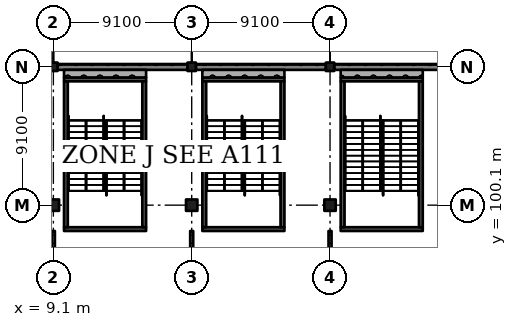
"""IFC4 building model, lengths in metres.
Left out: names, types, materials, properties, quantities, classifications, styles, units other than length and angle.
Written with IfcOpenShell. Run it as: python <this file> out.ifc"""

import sys

from ifc_helpers import new_model, si_unit, direction, frame, frame_2d, origin, origin_2d, place, context, subcontext, project, spatial, rectangle, extrude, element, fill, save


model = new_model("IFC4")
c1 = context("Model", 3, precision=1e-05, world=origin(), true_north=direction((0.0, 1.0)))
c2 = subcontext(c1, "Body", "Model", "MODEL_VIEW")
j1 = project(units=[si_unit("LENGTHUNIT", "METRE"), si_unit("PLANEANGLEUNIT", "RADIAN")], contexts=[c1])
p1 = place(None, origin())
s1 = spatial("IfcSite", under=j1, at=p1, CompositionType="ELEMENT")
p2 = place(p1, origin())
s2 = spatial("IfcBuilding", under=s1, at=p2, CompositionType="ELEMENT")
p3 = place(p2, origin())
s3 = spatial("IfcBuildingStorey", under=s2, at=p3, CompositionType="ELEMENT", Elevation=0.0)
p4 = place(p3, frame((9.1, 100.1, -0.4), z_axis=(0.0, 0.0, 1.0), x_axis=(1.0, 0.0, 0.0)))
e1 = element("IfcColumn", 1, at=p4, inside=s3, PredefinedType="COLUMN", context=c2, shape_type="SweptSolid", body=[
    extrude(rectangle(XDim=0.75, YDim=0.75, at=origin_2d()), origin(), (0.0, 0.0, 1.0), 6.77),
])
p5 = place(p3, frame((9.1, 109.2, -0.4), z_axis=(0.0, 0.0, 1.0), x_axis=(1.0, 0.0, 0.0)))
e2 = element("IfcColumn", 2, at=p5, inside=s3, PredefinedType="COLUMN", context=c2, shape_type="SweptSolid", body=[
    extrude(rectangle(XDim=0.55, YDim=0.55, at=origin_2d()), origin(), (0.0, 0.0, 1.0), 6.77),
])
p6 = place(p3, frame((18.2, 100.1, -0.4), z_axis=(0.0, 0.0, 1.0), x_axis=(1.0, 0.0, 0.0)))
e3 = element("IfcColumn", 3, at=p6, inside=s3, PredefinedType="COLUMN", context=c2, shape_type="SweptSolid", body=[
    extrude(rectangle(XDim=0.75, YDim=0.75, at=origin_2d()), origin(), (0.0, 0.0, 1.0), 6.77),
])
p7 = place(p3, frame((18.2, 109.2, -0.4), z_axis=(0.0, 0.0, 1.0), x_axis=(1.0, 0.0, 0.0)))
e4 = element("IfcColumn", 4, at=p7, inside=s3, PredefinedType="COLUMN", context=c2, shape_type="SweptSolid", body=[
    extrude(rectangle(XDim=0.55, YDim=0.55, at=origin_2d()), origin(), (0.0, 0.0, 1.0), 6.77),
])
p8 = place(p3, frame((27.3, 100.1, -0.4), z_axis=(0.0, 0.0, 1.0), x_axis=(1.0, 0.0, 0.0)))
e5 = element("IfcColumn", 5, at=p8, inside=s3, PredefinedType="COLUMN", context=c2, shape_type="SweptSolid", body=[
    extrude(rectangle(XDim=0.75, YDim=0.75, at=origin_2d()), origin(), (0.0, 0.0, 1.0), 6.77),
])
p9 = place(p3, frame((27.3, 109.2, -0.4), z_axis=(0.0, 0.0, 1.0), x_axis=(1.0, 0.0, 0.0)))
e6 = element("IfcColumn", 6, at=p9, inside=s3, PredefinedType="COLUMN", context=c2, shape_type="SweptSolid", body=[
    extrude(rectangle(XDim=0.55, YDim=0.55, at=origin_2d()), origin(), (0.0, 0.0, 1.0), 6.77),
])
p10 = place(p3, frame((15.2, 98.525, -0.4), z_axis=(0.0, 0.0, 1.0), x_axis=(-1.0, 0.0, 0.0)))
e7 = element("IfcWall", 7, at=p10, inside=s3, PredefinedType="SHEAR", context=c2, shape_type="SweptSolid", body=[
    extrude(rectangle(XDim=5.4, YDim=0.25, at=frame_2d((2.7, 0.0))), origin(), (0.0, 0.0, 1.0), 6.77),
])
p11 = place(p10, frame((1.5, 0.0, 0.4)))
e8 = element("IfcOpeningElement", 8, at=p11, cuts=e7, PredefinedType="OPENING", context=c2, shape_type="SweptSolid", body=[
    extrude(rectangle(XDim=2.4, YDim=2.1, at=frame_2d((1.2, 1.05))), frame((0.0, 0.135, 0.0), z_axis=(0.0, -1.0, 0.0), x_axis=(1.0, 0.0, 0.0)), (0.0, 0.0, 1.0), 0.27),
])
p12 = place(p3, frame((15.2, 108.375, -0.4), z_axis=(0.0, 0.0, 1.0), x_axis=(-1.0, 0.0, 0.0)))
e9 = element("IfcWall", 9, at=p12, inside=s3, PredefinedType="SHEAR", context=c2, shape_type="SweptSolid", body=[
    extrude(rectangle(XDim=5.4, YDim=0.25, at=frame_2d((2.7, 0.0))), origin(), (0.0, 0.0, 1.0), 6.77),
])
p13 = place(p3, frame((9.925, 108.25, -0.4), z_axis=(0.0, 0.0, 1.0), x_axis=(0.0, -1.0, 0.0)))
e10 = element("IfcWall", 10, at=p13, inside=s3, PredefinedType="SHEAR", context=c2, shape_type="SweptSolid", body=[
    extrude(rectangle(XDim=9.6, YDim=0.25, at=frame_2d((4.8, 0.0))), origin(), (0.0, 0.0, 1.0), 6.77),
])
p14 = place(p3, frame((15.075, 108.25, -0.4), z_axis=(0.0, 0.0, 1.0), x_axis=(0.0, -1.0, 0.0)))
e11 = element("IfcWall", 11, at=p14, inside=s3, PredefinedType="SHEAR", context=c2, shape_type="SweptSolid", body=[
    extrude(rectangle(XDim=9.6, YDim=0.25, at=frame_2d((4.8, 0.0))), origin(), (0.0, 0.0, 1.0), 6.77),
])
p15 = place(p14, frame((7.95, 0.0, 0.4)))
e12 = element("IfcOpeningElement", 12, at=p15, cuts=e11, PredefinedType="OPENING", context=c2, shape_type="SweptSolid", body=[
    extrude(rectangle(XDim=1.2, YDim=2.1, at=frame_2d((0.6, 1.05))), frame((0.0, 0.135, 0.0), z_axis=(0.0, -1.0, 0.0), x_axis=(1.0, 0.0, 0.0)), (0.0, 0.0, 1.0), 0.27),
])
p16 = place(p3, frame((24.3, 98.525, -0.4), z_axis=(0.0, 0.0, 1.0), x_axis=(-1.0, 0.0, 0.0)))
e13 = element("IfcWall", 13, at=p16, inside=s3, PredefinedType="SHEAR", context=c2, shape_type="SweptSolid", body=[
    extrude(rectangle(XDim=5.4, YDim=0.25, at=frame_2d((2.7, 0.0))), origin(), (0.0, 0.0, 1.0), 6.77),
])
p17 = place(p16, frame((1.5, 0.0, 0.4)))
e14 = element("IfcOpeningElement", 14, at=p17, cuts=e13, PredefinedType="OPENING", context=c2, shape_type="SweptSolid", body=[
    extrude(rectangle(XDim=2.4, YDim=2.1, at=frame_2d((1.2, 1.05))), frame((0.0, 0.135, 0.0), z_axis=(0.0, -1.0, 0.0), x_axis=(1.0, 0.0, 0.0)), (0.0, 0.0, 1.0), 0.27),
])
p18 = place(p3, frame((24.3, 108.375, -0.4), z_axis=(0.0, 0.0, 1.0), x_axis=(-1.0, 0.0, 0.0)))
e15 = element("IfcWall", 15, at=p18, inside=s3, PredefinedType="SHEAR", context=c2, shape_type="SweptSolid", body=[
    extrude(rectangle(XDim=5.4, YDim=0.25, at=frame_2d((2.7, 0.0))), origin(), (0.0, 0.0, 1.0), 6.77),
])
p19 = place(p3, frame((19.025, 108.25, -0.4), z_axis=(0.0, 0.0, 1.0), x_axis=(0.0, -1.0, 0.0)))
e16 = element("IfcWall", 16, at=p19, inside=s3, PredefinedType="SHEAR", context=c2, shape_type="SweptSolid", body=[
    extrude(rectangle(XDim=9.6, YDim=0.25, at=frame_2d((4.8, 0.0))), origin(), (0.0, 0.0, 1.0), 6.77),
])
p20 = place(p3, frame((24.175, 108.25, -0.4), z_axis=(0.0, 0.0, 1.0), x_axis=(0.0, -1.0, 0.0)))
e17 = element("IfcWall", 17, at=p20, inside=s3, PredefinedType="SHEAR", context=c2, shape_type="SweptSolid", body=[
    extrude(rectangle(XDim=9.6, YDim=0.25, at=frame_2d((4.8, 0.0))), origin(), (0.0, 0.0, 1.0), 6.77),
])
p21 = place(p20, frame((7.95, 0.0, 0.4)))
e18 = element("IfcOpeningElement", 18, at=p21, cuts=e17, PredefinedType="OPENING", context=c2, shape_type="SweptSolid", body=[
    extrude(rectangle(XDim=1.2, YDim=2.1, at=frame_2d((0.6, 1.05))), frame((0.0, 0.135, 0.0), z_axis=(0.0, -1.0, 0.0), x_axis=(1.0, 0.0, 0.0)), (0.0, 0.0, 1.0), 0.27),
])
p22 = place(p3, frame((33.4, 98.525, -0.4), z_axis=(0.0, 0.0, 1.0), x_axis=(-1.0, 0.0, 0.0)))
e19 = element("IfcWall", 19, at=p22, inside=s3, PredefinedType="SHEAR", context=c2, shape_type="SweptSolid", body=[
    extrude(rectangle(XDim=5.4, YDim=0.25, at=frame_2d((2.7, 0.0))), origin(), (0.0, 0.0, 1.0), 6.77),
])
p23 = place(p22, frame((1.5, 0.0, 0.4)))
e20 = element("IfcOpeningElement", 20, at=p23, cuts=e19, PredefinedType="OPENING", context=c2, shape_type="SweptSolid", body=[
    extrude(rectangle(XDim=2.4, YDim=2.1, at=frame_2d((1.2, 1.05))), frame((0.0, 0.135, 0.0), z_axis=(0.0, -1.0, 0.0), x_axis=(1.0, 0.0, 0.0)), (0.0, 0.0, 1.0), 0.27),
])
p24 = place(p3, frame((33.4, 108.375, -0.4), z_axis=(0.0, 0.0, 1.0), x_axis=(-1.0, 0.0, 0.0)))
e21 = element("IfcWall", 21, at=p24, inside=s3, PredefinedType="SHEAR", context=c2, shape_type="SweptSolid", body=[
    extrude(rectangle(XDim=5.4, YDim=0.25, at=frame_2d((2.7, 0.0))), origin(), (0.0, 0.0, 1.0), 6.77),
])
p25 = place(p3, frame((28.125, 108.25, -0.4), z_axis=(0.0, 0.0, 1.0), x_axis=(0.0, -1.0, 0.0)))
e22 = element("IfcWall", 22, at=p25, inside=s3, PredefinedType="SHEAR", context=c2, shape_type="SweptSolid", body=[
    extrude(rectangle(XDim=9.6, YDim=0.25, at=frame_2d((4.8, 0.0))), origin(), (0.0, 0.0, 1.0), 6.77),
])
p26 = place(p3, frame((33.275, 108.25, -0.4), z_axis=(0.0, 0.0, 1.0), x_axis=(0.0, -1.0, 0.0)))
e23 = element("IfcWall", 23, at=p26, inside=s3, PredefinedType="SHEAR", context=c2, shape_type="SweptSolid", body=[
    extrude(rectangle(XDim=9.6, YDim=0.25, at=frame_2d((4.8, 0.0))), origin(), (0.0, 0.0, 1.0), 6.77),
])
p27 = place(p26, frame((7.95, 0.0, 0.4)))
e24 = element("IfcOpeningElement", 24, at=p27, cuts=e23, PredefinedType="OPENING", context=c2, shape_type="SweptSolid", body=[
    extrude(rectangle(XDim=1.2, YDim=2.1, at=frame_2d((0.6, 1.05))), frame((0.0, 0.135, 0.0), z_axis=(0.0, -1.0, 0.0), x_axis=(1.0, 0.0, 0.0)), (0.0, 0.0, 1.0), 0.27),
])
p28 = place(p3, frame((36.05, 109.175, 0.0), z_axis=(0.0, 0.0, 1.0), x_axis=(-1.0, 0.0, 0.0)))
e25 = element("IfcWall", 25, at=p28, inside=s3, PredefinedType="SOLIDWALL", context=c2, shape_type="SweptSolid", body=[
    extrude(rectangle(XDim=8.475, YDim=0.35, at=frame_2d((4.238, 0.0))), origin(), (0.0, 0.0, 1.0), 5.27),
])
p29 = place(p28, frame((0.4, 0.0, 0.0)))
e26 = element("IfcOpeningElement", 26, at=p29, cuts=e25, PredefinedType="OPENING", context=c2, shape_type="SweptSolid", body=[
    extrude(rectangle(XDim=2.1, YDim=2.4, at=frame_2d((1.05, 1.2))), frame((0.0, 0.185, 0.0), z_axis=(0.0, -1.0, 0.0), x_axis=(1.0, 0.0, 0.0)), (0.0, 0.0, 1.0), 0.37),
])
p30 = place(p3, frame((27.025, 109.175, 0.0), z_axis=(0.0, 0.0, 1.0), x_axis=(-1.0, 0.0, 0.0)))
e27 = element("IfcWall", 27, at=p30, inside=s3, PredefinedType="SOLIDWALL", context=c2, shape_type="SweptSolid", body=[
    extrude(rectangle(XDim=8.55, YDim=0.35, at=frame_2d((4.275, 0.0))), origin(), (0.0, 0.0, 1.0), 5.27),
])
p31 = place(p30, frame((0.475, 0.0, 0.0)))
e28 = element("IfcOpeningElement", 28, at=p31, cuts=e27, PredefinedType="OPENING", context=c2, shape_type="SweptSolid", body=[
    extrude(rectangle(XDim=2.1, YDim=2.4, at=frame_2d((1.05, 1.2))), frame((0.0, 0.185, 0.0), z_axis=(0.0, -1.0, 0.0), x_axis=(1.0, 0.0, 0.0)), (0.0, 0.0, 1.0), 0.37),
])
p32 = place(p3, frame((17.925, 109.175, 0.0), z_axis=(0.0, 0.0, 1.0), x_axis=(-1.0, 0.0, 0.0)))
e29 = element("IfcWall", 29, at=p32, inside=s3, PredefinedType="SOLIDWALL", context=c2, shape_type="SweptSolid", body=[
    extrude(rectangle(XDim=8.55, YDim=0.35, at=frame_2d((4.275, 0.0))), origin(), (0.0, 0.0, 1.0), 5.27),
])
p33 = place(p32, frame((0.475, 0.0, 0.0)))
e30 = element("IfcOpeningElement", 30, at=p33, cuts=e29, PredefinedType="OPENING", context=c2, shape_type="SweptSolid", body=[
    extrude(rectangle(XDim=2.1, YDim=2.4, at=frame_2d((1.05, 1.2))), frame((0.0, 0.185, 0.0), z_axis=(0.0, -1.0, 0.0), x_axis=(1.0, 0.0, 0.0)), (0.0, 0.0, 1.0), 0.37),
])
p34 = place(p3, frame((9.8, 108.75, 0.0), z_axis=(0.0, 0.0, 1.0), x_axis=(1.0, 0.0, 0.0)))
e31 = element("IfcWall", 31, at=p34, inside=s3, PredefinedType="SOLIDWALL", context=c2, shape_type="SweptSolid", body=[
    extrude(rectangle(XDim=5.4, YDim=0.5, at=frame_2d((2.7, 0.0))), origin(), (0.0, 0.0, 1.0), 6.37),
])
p35 = place(p3, frame((18.9, 108.75, 0.0), z_axis=(0.0, 0.0, 1.0), x_axis=(1.0, 0.0, 0.0)))
e32 = element("IfcWall", 32, at=p35, inside=s3, PredefinedType="SOLIDWALL", context=c2, shape_type="SweptSolid", body=[
    extrude(rectangle(XDim=5.4, YDim=0.5, at=frame_2d((2.7, 0.0))), origin(), (0.0, 0.0, 1.0), 6.37),
])
p36 = place(p3, frame((28.0, 108.75, 0.0), z_axis=(0.0, 0.0, 1.0), x_axis=(1.0, 0.0, 0.0)))
e33 = element("IfcWall", 33, at=p36, inside=s3, PredefinedType="SOLIDWALL", context=c2, shape_type="SweptSolid", body=[
    extrude(rectangle(XDim=5.4, YDim=0.5, at=frame_2d((2.7, 0.0))), origin(), (0.0, 0.0, 1.0), 6.37),
])
p37 = place(p3, frame((9.1, 98.4, 0.0), z_axis=(0.0, 0.0, 1.0), x_axis=(0.0, -1.0, 0.0)))
e34 = element("IfcWall", 34, at=p37, inside=s3, PredefinedType="PARTITIONING", context=c2, shape_type="SweptSolid", body=[
    extrude(rectangle(XDim=6.975, YDim=0.2, at=frame_2d((3.487, 0.0))), origin(), (0.0, 0.0, 1.0), 5.32),
])
p38 = place(p37, frame((0.85, 0.0, 0.0)))
e35 = element("IfcOpeningElement", 35, at=p38, cuts=e34, PredefinedType="OPENING", context=c2, shape_type="SweptSolid", body=[
    extrude(rectangle(XDim=1.8, YDim=2.4, at=frame_2d((0.9, 1.2))), frame((0.0, 0.11, 0.0), z_axis=(0.0, -1.0, 0.0), x_axis=(1.0, 0.0, 0.0)), (0.0, 0.0, 1.0), 0.22),
])
p39 = place(p37, frame((4.35, 0.0, 0.0)))
e36 = element("IfcOpeningElement", 36, at=p39, cuts=e34, PredefinedType="OPENING", context=c2, shape_type="SweptSolid", body=[
    extrude(rectangle(XDim=1.8, YDim=2.4, at=frame_2d((0.9, 1.2))), frame((0.0, 0.11, 0.0), z_axis=(0.0, -1.0, 0.0), x_axis=(1.0, 0.0, 0.0)), (0.0, 0.0, 1.0), 0.22),
])
p40 = place(p3, frame((18.2, 98.4, 0.0), z_axis=(0.0, 0.0, 1.0), x_axis=(0.0, -1.0, 0.0)))
e37 = element("IfcWall", 37, at=p40, inside=s3, PredefinedType="PARTITIONING", context=c2, shape_type="SweptSolid", body=[
    extrude(rectangle(XDim=6.925, YDim=0.2, at=frame_2d((3.462, 0.0))), origin(), (0.0, 0.0, 1.0), 5.32),
])
p41 = place(p40, frame((0.85, 0.0, 0.0)))
e38 = element("IfcOpeningElement", 38, at=p41, cuts=e37, PredefinedType="OPENING", context=c2, shape_type="SweptSolid", body=[
    extrude(rectangle(XDim=1.8, YDim=2.4, at=frame_2d((0.9, 1.2))), frame((0.0, 0.11, 0.0), z_axis=(0.0, -1.0, 0.0), x_axis=(1.0, 0.0, 0.0)), (0.0, 0.0, 1.0), 0.22),
])
p42 = place(p40, frame((4.25, 0.0, 0.0)))
e39 = element("IfcOpeningElement", 39, at=p42, cuts=e37, PredefinedType="OPENING", context=c2, shape_type="SweptSolid", body=[
    extrude(rectangle(XDim=1.8, YDim=2.4, at=frame_2d((0.9, 1.2))), frame((0.0, 0.11, 0.0), z_axis=(0.0, -1.0, 0.0), x_axis=(1.0, 0.0, 0.0)), (0.0, 0.0, 1.0), 0.22),
])
p43 = place(p3, frame((27.3, 98.4, 0.0), z_axis=(0.0, 0.0, 1.0), x_axis=(0.0, -1.0, 0.0)))
e40 = element("IfcWall", 40, at=p43, inside=s3, PredefinedType="PARTITIONING", context=c2, shape_type="SweptSolid", body=[
    extrude(rectangle(XDim=6.925, YDim=0.2, at=frame_2d((3.462, 0.0))), origin(), (0.0, 0.0, 1.0), 5.32),
])
p44 = place(p43, frame((0.85, 0.0, 0.0)))
e41 = element("IfcOpeningElement", 41, at=p44, cuts=e40, PredefinedType="OPENING", context=c2, shape_type="SweptSolid", body=[
    extrude(rectangle(XDim=1.8, YDim=2.4, at=frame_2d((0.9, 1.2))), frame((0.0, 0.11, 0.0), z_axis=(0.0, -1.0, 0.0), x_axis=(1.0, 0.0, 0.0)), (0.0, 0.0, 1.0), 0.22),
])
p45 = place(p43, frame((4.25, 0.0, 0.0)))
e42 = element("IfcOpeningElement", 42, at=p45, cuts=e40, PredefinedType="OPENING", context=c2, shape_type="SweptSolid", body=[
    extrude(rectangle(XDim=1.8, YDim=2.4, at=frame_2d((0.9, 1.2))), frame((0.0, 0.11, 0.0), z_axis=(0.0, -1.0, 0.0), x_axis=(1.0, 0.0, 0.0)), (0.0, 0.0, 1.0), 0.22),
])
p46 = place(p29, frame((2.1, 0.0, 0.0), z_axis=(0.0, 0.0, 1.0), x_axis=(-1.0, 0.0, 0.0)))
e43 = element("IfcDoor", 43, at=p46, inside=s3, OperationType="DOUBLE_DOOR_SINGLE_SWING", PredefinedType="DOOR", context=c2, shape_type="SweptSolid", body=[
    extrude(rectangle(XDim=2.1, YDim=2.4, at=frame_2d((1.05, 1.2))), frame((0.0, 0.025, 0.0), z_axis=(0.0, -1.0, 0.0), x_axis=(1.0, 0.0, 0.0)), (0.0, 0.0, 1.0), 0.05),
])
fill(e26, e43)
p47 = place(p31, frame((2.1, 0.0, 0.0), z_axis=(0.0, 0.0, 1.0), x_axis=(-1.0, 0.0, 0.0)))
e44 = element("IfcDoor", 44, at=p47, inside=s3, OperationType="DOUBLE_DOOR_SINGLE_SWING", PredefinedType="DOOR", context=c2, shape_type="SweptSolid", body=[
    extrude(rectangle(XDim=2.1, YDim=2.4, at=frame_2d((1.05, 1.2))), frame((0.0, 0.025, 0.0), z_axis=(0.0, -1.0, 0.0), x_axis=(1.0, 0.0, 0.0)), (0.0, 0.0, 1.0), 0.05),
])
fill(e28, e44)
p48 = place(p33, frame((2.1, 0.0, 0.0), z_axis=(0.0, 0.0, 1.0), x_axis=(-1.0, 0.0, 0.0)))
e45 = element("IfcDoor", 45, at=p48, inside=s3, OperationType="DOUBLE_DOOR_SINGLE_SWING", PredefinedType="DOOR", context=c2, shape_type="SweptSolid", body=[
    extrude(rectangle(XDim=2.1, YDim=2.4, at=frame_2d((1.05, 1.2))), frame((0.0, 0.025, 0.0), z_axis=(0.0, -1.0, 0.0), x_axis=(1.0, 0.0, 0.0)), (0.0, 0.0, 1.0), 0.05),
])
fill(e30, e45)
p49 = place(p38, origin())
e46 = element("IfcDoor", 46, at=p49, inside=s3, OperationType="DOUBLE_DOOR_SINGLE_SWING", PredefinedType="DOOR", context=c2, shape_type="SweptSolid", body=[
    extrude(rectangle(XDim=1.8, YDim=2.4, at=frame_2d((0.9, 1.2))), frame((0.0, 0.025, 0.0), z_axis=(0.0, -1.0, 0.0), x_axis=(1.0, 0.0, 0.0)), (0.0, 0.0, 1.0), 0.05),
])
fill(e35, e46)
p50 = place(p41, origin())
e47 = element("IfcDoor", 47, at=p50, inside=s3, OperationType="DOUBLE_DOOR_SINGLE_SWING", PredefinedType="DOOR", context=c2, shape_type="SweptSolid", body=[
    extrude(rectangle(XDim=1.8, YDim=2.4, at=frame_2d((0.9, 1.2))), frame((0.0, 0.025, 0.0), z_axis=(0.0, -1.0, 0.0), x_axis=(1.0, 0.0, 0.0)), (0.0, 0.0, 1.0), 0.05),
])
fill(e38, e47)
p51 = place(p44, origin())
e48 = element("IfcDoor", 48, at=p51, inside=s3, OperationType="DOUBLE_DOOR_SINGLE_SWING", PredefinedType="DOOR", context=c2, shape_type="SweptSolid", body=[
    extrude(rectangle(XDim=1.8, YDim=2.4, at=frame_2d((0.9, 1.2))), frame((0.0, 0.025, 0.0), z_axis=(0.0, -1.0, 0.0), x_axis=(1.0, 0.0, 0.0)), (0.0, 0.0, 1.0), 0.05),
])
fill(e41, e48)
p52 = place(p11, origin())
e49 = element("IfcDoor", 49, at=p52, inside=s3, OperationType="DOUBLE_DOOR_SINGLE_SWING", PredefinedType="DOOR", context=c2, shape_type="SweptSolid", body=[
    extrude(rectangle(XDim=2.4, YDim=2.1, at=frame_2d((1.2, 1.05))), frame((0.0, 0.025, 0.0), z_axis=(0.0, -1.0, 0.0), x_axis=(1.0, 0.0, 0.0)), (0.0, 0.0, 1.0), 0.05),
])
fill(e8, e49)
p53 = place(p17, origin())
e50 = element("IfcDoor", 50, at=p53, inside=s3, OperationType="DOUBLE_DOOR_SINGLE_SWING", PredefinedType="DOOR", context=c2, shape_type="SweptSolid", body=[
    extrude(rectangle(XDim=2.4, YDim=2.1, at=frame_2d((1.2, 1.05))), frame((0.0, 0.025, 0.0), z_axis=(0.0, -1.0, 0.0), x_axis=(1.0, 0.0, 0.0)), (0.0, 0.0, 1.0), 0.05),
])
fill(e14, e50)
p54 = place(p23, origin())
e51 = element("IfcDoor", 51, at=p54, inside=s3, OperationType="DOUBLE_DOOR_SINGLE_SWING", PredefinedType="DOOR", context=c2, shape_type="SweptSolid", body=[
    extrude(rectangle(XDim=2.4, YDim=2.1, at=frame_2d((1.2, 1.05))), frame((0.0, 0.025, 0.0), z_axis=(0.0, -1.0, 0.0), x_axis=(1.0, 0.0, 0.0)), (0.0, 0.0, 1.0), 0.05),
])
fill(e20, e51)
p55 = place(p15, origin())
e52 = element("IfcDoor", 52, at=p55, inside=s3, OperationType="SINGLE_SWING_LEFT", PredefinedType="DOOR", context=c2, shape_type="SweptSolid", body=[
    extrude(rectangle(XDim=1.2, YDim=2.1, at=frame_2d((0.6, 1.05))), frame((0.0, 0.025, 0.0), z_axis=(0.0, -1.0, 0.0), x_axis=(1.0, 0.0, 0.0)), (0.0, 0.0, 1.0), 0.05),
])
fill(e12, e52)
p56 = place(p21, origin())
e53 = element("IfcDoor", 53, at=p56, inside=s3, OperationType="SINGLE_SWING_LEFT", PredefinedType="DOOR", context=c2, shape_type="SweptSolid", body=[
    extrude(rectangle(XDim=1.2, YDim=2.1, at=frame_2d((0.6, 1.05))), frame((0.0, 0.025, 0.0), z_axis=(0.0, -1.0, 0.0), x_axis=(1.0, 0.0, 0.0)), (0.0, 0.0, 1.0), 0.05),
])
fill(e18, e53)
p57 = place(p27, origin())
e54 = element("IfcDoor", 54, at=p57, inside=s3, OperationType="SINGLE_SWING_LEFT", PredefinedType="DOOR", context=c2, shape_type="SweptSolid", body=[
    extrude(rectangle(XDim=1.2, YDim=2.1, at=frame_2d((0.6, 1.05))), frame((0.0, 0.025, 0.0), z_axis=(0.0, -1.0, 0.0), x_axis=(1.0, 0.0, 0.0)), (0.0, 0.0, 1.0), 0.05),
])
fill(e24, e54)
save(model, sys.argv[1])
